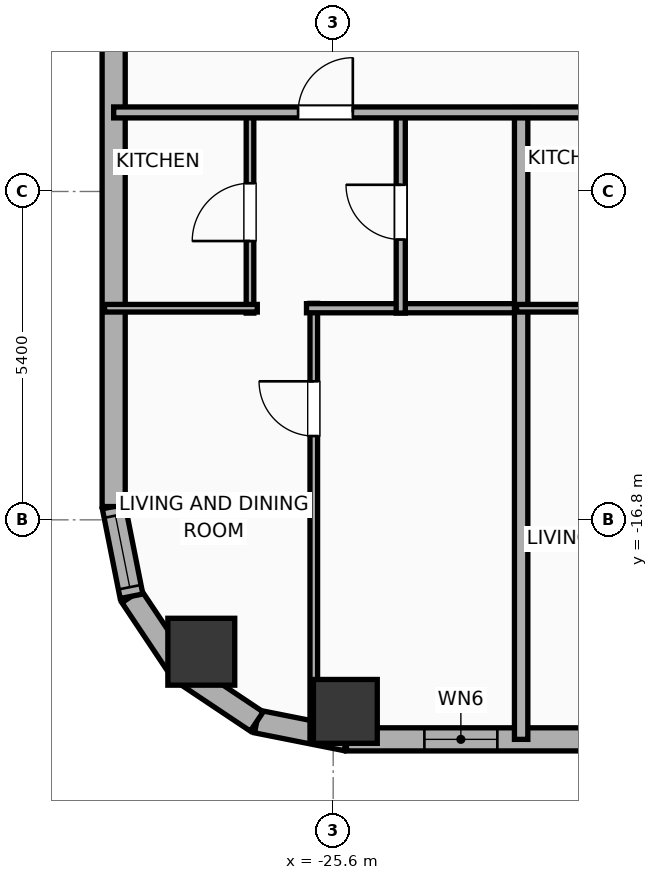
"""IFC4 building model, lengths in metres.
Left out: names, types, materials, properties, quantities, classifications, styles, units other than length and angle.
Written with IfcOpenShell. Run it as: python <this file> out.ifc"""

import sys

from ifc_helpers import new_model, si_unit, direction, frame, frame_2d, origin, origin_2d, place, context, subcontext, project, spatial, rectangle, hollow_rectangle, hollow_circle, extrude, element, fill, save


model = new_model("IFC4")
c1 = context("Model", 3, precision=1e-05, world=origin(), true_north=direction((0.0, 1.0)))
c2 = subcontext(c1, "Body", "Model", "MODEL_VIEW")
j1 = project(units=[si_unit("LENGTHUNIT", "METRE"), si_unit("PLANEANGLEUNIT", "RADIAN")], contexts=[c1])
p1 = place(None, origin())
s1 = spatial("IfcSite", under=j1, at=p1, CompositionType="ELEMENT")
p2 = place(p1, origin())
s2 = spatial("IfcBuilding", under=s1, at=p2, CompositionType="ELEMENT")
p3 = place(p2, frame((0.0, 0.0, 101.4)))
s3 = spatial("IfcBuildingStorey", under=s2, at=p3, CompositionType="ELEMENT", Elevation=101.4)
p4 = place(p3, frame((-25.4, -19.95, 0.0), z_axis=(0.0, 0.0, 1.0), x_axis=(1.0, 0.0, 0.0)))
e1 = element("IfcColumn", 1, at=p4, inside=s3, PredefinedType="COLUMN", context=c2, shape_type="SweptSolid", body=[
    extrude(hollow_rectangle(XDim=1.05, YDim=1.05, WallThickness=0.036, at=origin_2d()), origin(), (0.0, 0.0, 1.0), 3.9),
])
p5 = place(p3, frame((-27.769, -18.969, 0.0), z_axis=(0.0, 0.0, 1.0), x_axis=(1.0, 0.0, 0.0)))
e2 = element("IfcColumn", 2, at=p5, inside=s3, PredefinedType="COLUMN", context=c2, shape_type="SweptSolid", body=[
    extrude(hollow_circle(Radius=0.55, WallThickness=0.036, at=origin_2d()), origin(), (0.0, 0.0, 1.0), 3.9),
])
p6 = place(p3, frame((29.381, -20.41, 0.0), z_axis=(0.0, 0.0, 1.0), x_axis=(-1.0, 0.0, 0.0)))
e3 = element("IfcWall", 3, at=p6, inside=s3, PredefinedType="ELEMENTEDWALL", context=c2, shape_type="SweptSolid", body=[
    extrude(rectangle(XDim=54.763, YDim=0.38, at=frame_2d((27.381, 0.0))), origin(), (0.0, 0.0, 1.0), 3.65),
])
p7 = place(p6, frame((6.495, 0.0, 0.75)))
e4 = element("IfcOpeningElement", 4, at=p7, cuts=e3, PredefinedType="OPENING", context=c2, shape_type="SweptSolid", body=[
    extrude(rectangle(XDim=2.4, YDim=2.1, at=frame_2d((1.2, 1.05))), frame((0.0, 0.2, 0.0), z_axis=(0.0, -1.0, 0.0), x_axis=(1.0, 0.0, 0.0)), (0.0, 0.0, 1.0), 0.4),
])
p8 = place(p6, frame((17.686, 0.0, 0.75)))
e5 = element("IfcOpeningElement", 5, at=p8, cuts=e3, PredefinedType="OPENING", context=c2, shape_type="SweptSolid", body=[
    extrude(rectangle(XDim=2.4, YDim=2.1, at=frame_2d((1.2, 1.05))), frame((0.0, 0.2, 0.0), z_axis=(0.0, -1.0, 0.0), x_axis=(1.0, 0.0, 0.0)), (0.0, 0.0, 1.0), 0.4),
])
p9 = place(p6, frame((34.677, 0.0, 0.75)))
e6 = element("IfcOpeningElement", 6, at=p9, cuts=e3, PredefinedType="OPENING", context=c2, shape_type="SweptSolid", body=[
    extrude(rectangle(XDim=2.4, YDim=2.1, at=frame_2d((1.2, 1.05))), frame((0.0, 0.2, 0.0), z_axis=(0.0, -1.0, 0.0), x_axis=(1.0, 0.0, 0.0)), (0.0, 0.0, 1.0), 0.4),
])
p10 = place(p6, frame((45.867, 0.0, 0.75)))
e7 = element("IfcOpeningElement", 7, at=p10, cuts=e3, PredefinedType="OPENING", context=c2, shape_type="SweptSolid", body=[
    extrude(rectangle(XDim=2.4, YDim=2.1, at=frame_2d((1.2, 1.05))), frame((0.0, 0.2, 0.0), z_axis=(0.0, -1.0, 0.0), x_axis=(1.0, 0.0, 0.0)), (0.0, 0.0, 1.0), 0.4),
])
p11 = place(p6, frame((52.281, 0.0, 0.75)))
e8 = element("IfcOpeningElement", 8, at=p11, cuts=e3, PredefinedType="OPENING", context=c2, shape_type="SweptSolid", body=[
    extrude(rectangle(XDim=1.2, YDim=2.05, at=frame_2d((0.6, 1.025))), frame((0.0, 0.2, 0.0), z_axis=(0.0, -1.0, 0.0), x_axis=(1.0, 0.0, 0.0)), (0.0, 0.0, 1.0), 0.4),
])
p12 = place(p6, frame((49.641, 0.0, 0.75)))
e9 = element("IfcOpeningElement", 9, at=p12, cuts=e3, PredefinedType="OPENING", context=c2, shape_type="SweptSolid", body=[
    extrude(rectangle(XDim=1.2, YDim=2.05, at=frame_2d((0.6, 1.025))), frame((0.0, 0.2, 0.0), z_axis=(0.0, -1.0, 0.0), x_axis=(1.0, 0.0, 0.0)), (0.0, 0.0, 1.0), 0.4),
])
p13 = place(p6, frame((39.543, 0.0, 0.75)))
e10 = element("IfcOpeningElement", 10, at=p13, cuts=e3, PredefinedType="OPENING", context=c2, shape_type="SweptSolid", body=[
    extrude(rectangle(XDim=1.2, YDim=2.05, at=frame_2d((0.6, 1.025))), frame((0.0, 0.2, 0.0), z_axis=(0.0, -1.0, 0.0), x_axis=(1.0, 0.0, 0.0)), (0.0, 0.0, 1.0), 0.4),
])
p14 = place(p6, frame((44.538, 0.0, 0.75)))
e11 = element("IfcOpeningElement", 11, at=p14, cuts=e3, PredefinedType="OPENING", context=c2, shape_type="SweptSolid", body=[
    extrude(rectangle(XDim=0.52, YDim=2.05, at=frame_2d((0.26, 1.025))), frame((0.0, 0.2, 0.0), z_axis=(0.0, -1.0, 0.0), x_axis=(1.0, 0.0, 0.0)), (0.0, 0.0, 1.0), 0.4),
])
p15 = place(p6, frame((28.206, 0.0, 0.75)))
e12 = element("IfcOpeningElement", 12, at=p15, cuts=e3, PredefinedType="OPENING", context=c2, shape_type="SweptSolid", body=[
    extrude(rectangle(XDim=1.2, YDim=2.05, at=frame_2d((0.6, 1.025))), frame((0.0, 0.2, 0.0), z_axis=(0.0, -1.0, 0.0), x_axis=(1.0, 0.0, 0.0)), (0.0, 0.0, 1.0), 0.4),
])
p16 = place(p6, frame((31.241, 0.0, 0.75)))
e13 = element("IfcOpeningElement", 13, at=p16, cuts=e3, PredefinedType="OPENING", context=c2, shape_type="SweptSolid", body=[
    extrude(rectangle(XDim=0.85, YDim=2.05, at=frame_2d((0.425, 1.025))), frame((0.0, 0.2, 0.0), z_axis=(0.0, -1.0, 0.0), x_axis=(1.0, 0.0, 0.0)), (0.0, 0.0, 1.0), 0.4),
])
p17 = place(p6, frame((24.561, 0.0, 0.75)))
e14 = element("IfcOpeningElement", 14, at=p17, cuts=e3, PredefinedType="OPENING", context=c2, shape_type="SweptSolid", body=[
    extrude(rectangle(XDim=1.2, YDim=2.05, at=frame_2d((0.6, 1.025))), frame((0.0, 0.2, 0.0), z_axis=(0.0, -1.0, 0.0), x_axis=(1.0, 0.0, 0.0)), (0.0, 0.0, 1.0), 0.4),
])
p18 = place(p6, frame((22.561, 0.0, 0.75)))
e15 = element("IfcOpeningElement", 15, at=p18, cuts=e3, PredefinedType="OPENING", context=c2, shape_type="SweptSolid", body=[
    extrude(rectangle(XDim=0.52, YDim=2.05, at=frame_2d((0.26, 1.025))), frame((0.0, 0.2, 0.0), z_axis=(0.0, -1.0, 0.0), x_axis=(1.0, 0.0, 0.0)), (0.0, 0.0, 1.0), 0.4),
])
p19 = place(p6, frame((13.886, 0.0, 0.75)))
e16 = element("IfcOpeningElement", 16, at=p19, cuts=e3, PredefinedType="OPENING", context=c2, shape_type="SweptSolid", body=[
    extrude(rectangle(XDim=1.2, YDim=2.05, at=frame_2d((0.6, 1.025))), frame((0.0, 0.2, 0.0), z_axis=(0.0, -1.0, 0.0), x_axis=(1.0, 0.0, 0.0)), (0.0, 0.0, 1.0), 0.4),
])
p20 = place(p6, frame((11.694, 0.0, 0.75)))
e17 = element("IfcOpeningElement", 17, at=p20, cuts=e3, PredefinedType="OPENING", context=c2, shape_type="SweptSolid", body=[
    extrude(rectangle(XDim=0.85, YDim=2.05, at=frame_2d((0.425, 1.025))), frame((0.0, 0.2, 0.0), z_axis=(0.0, -1.0, 0.0), x_axis=(1.0, 0.0, 0.0)), (0.0, 0.0, 1.0), 0.4),
])
p21 = place(p6, frame((3.286, 0.0, 0.75)))
e18 = element("IfcOpeningElement", 18, at=p21, cuts=e3, PredefinedType="OPENING", context=c2, shape_type="SweptSolid", body=[
    extrude(rectangle(XDim=1.2, YDim=2.05, at=frame_2d((0.6, 1.025))), frame((0.0, 0.2, 0.0), z_axis=(0.0, -1.0, 0.0), x_axis=(1.0, 0.0, 0.0)), (0.0, 0.0, 1.0), 0.4),
])
p22 = place(p6, frame((0.816, 0.0, 0.75)))
e19 = element("IfcOpeningElement", 19, at=p22, cuts=e3, PredefinedType="OPENING", context=c2, shape_type="SweptSolid", body=[
    extrude(rectangle(XDim=1.2, YDim=2.05, at=frame_2d((0.6, 1.025))), frame((0.0, 0.2, 0.0), z_axis=(0.0, -1.0, 0.0), x_axis=(1.0, 0.0, 0.0)), (0.0, 0.0, 1.0), 0.4),
])
p23 = place(p3, frame((-25.381, -20.41, 0.0), z_axis=(0.0, 0.0, 1.0), x_axis=(-0.980786132421, 0.195086038585, 0.0)))
e20 = element("IfcWall", 20, at=p23, inside=s3, PredefinedType="ELEMENTEDWALL", context=c2, shape_type="SweptSolid", body=[
    extrude(rectangle(XDim=1.504, YDim=0.38, at=frame_2d((0.752, 0.0))), origin(), (0.0, 0.0, 1.0), 3.65),
])
p24 = place(p3, frame((-26.857, -20.116, 0.0), z_axis=(0.0, 0.0, 1.0), x_axis=(-0.831468045563, 0.555572577804, 0.0)))
e21 = element("IfcWall", 21, at=p24, inside=s3, PredefinedType="ELEMENTEDWALL", context=c2, shape_type="SweptSolid", body=[
    extrude(rectangle(XDim=1.485, YDim=0.38, at=frame_2d((0.742, 0.0))), origin(), (0.0, 0.0, 1.0), 3.65),
])
p25 = place(p3, frame((-28.091, -19.292, 0.0), z_axis=(0.0, 0.0, 1.0), x_axis=(-0.555610286119, 0.831442848281, 0.0)))
e22 = element("IfcWall", 22, at=p25, inside=s3, PredefinedType="ELEMENTEDWALL", context=c2, shape_type="SweptSolid", body=[
    extrude(rectangle(XDim=1.485, YDim=0.38, at=frame_2d((0.743, 0.0))), origin(), (0.0, 0.0, 1.0), 3.65),
])
p26 = place(p3, frame((-28.917, -18.057, 0.0), z_axis=(0.0, 0.0, 1.0), x_axis=(-0.195086038585, 0.980786132421, 0.0)))
e23 = element("IfcWall", 23, at=p26, inside=s3, PredefinedType="ELEMENTEDWALL", context=c2, shape_type="SweptSolid", body=[
    extrude(rectangle(XDim=1.504, YDim=0.38, at=frame_2d((0.752, 0.0))), origin(), (0.0, 0.0, 1.0), 3.65),
])
p27 = place(p26, frame((0.152, 0.0, 0.75)))
e24 = element("IfcOpeningElement", 24, at=p27, cuts=e23, PredefinedType="OPENING", context=c2, shape_type="SweptSolid", body=[
    extrude(rectangle(XDim=1.2, YDim=2.05, at=frame_2d((0.6, 1.025))), frame((0.0, 0.2, 0.0), z_axis=(0.0, -1.0, 0.0), x_axis=(1.0, 0.0, 0.0)), (0.0, 0.0, 1.0), 0.4),
])
p28 = place(p3, frame((-29.21, -16.581, 0.0), z_axis=(0.0, 0.0, 1.0), x_axis=(0.0, 1.0, 0.0)))
e25 = element("IfcWall", 25, at=p28, inside=s3, PredefinedType="ELEMENTEDWALL", context=c2, shape_type="SweptSolid", body=[
    extrude(rectangle(XDim=34.363, YDim=0.38, at=frame_2d((17.181, 0.0))), origin(), (0.0, 0.0, 1.0), 3.65),
])
p29 = place(p28, frame((31.087, 0.0, 0.75)))
e26 = element("IfcOpeningElement", 26, at=p29, cuts=e25, PredefinedType="OPENING", context=c2, shape_type="SweptSolid", body=[
    extrude(rectangle(XDim=1.2, YDim=2.05, at=frame_2d((0.6, 1.025))), frame((0.0, 0.2, 0.0), z_axis=(0.0, -1.0, 0.0), x_axis=(1.0, 0.0, 0.0)), (0.0, 0.0, 1.0), 0.4),
])
p30 = place(p28, frame((21.626, 0.0, 0.75)))
e27 = element("IfcOpeningElement", 27, at=p30, cuts=e25, PredefinedType="OPENING", context=c2, shape_type="SweptSolid", body=[
    extrude(rectangle(XDim=1.2, YDim=2.05, at=frame_2d((0.6, 1.025))), frame((0.0, 0.2, 0.0), z_axis=(0.0, -1.0, 0.0), x_axis=(1.0, 0.0, 0.0)), (0.0, 0.0, 1.0), 0.4),
])
p31 = place(p28, frame((10.551, 0.0, 0.75)))
e28 = element("IfcOpeningElement", 28, at=p31, cuts=e25, PredefinedType="OPENING", context=c2, shape_type="SweptSolid", body=[
    extrude(rectangle(XDim=1.2, YDim=2.05, at=frame_2d((0.6, 1.025))), frame((0.0, 0.2, 0.0), z_axis=(0.0, -1.0, 0.0), x_axis=(1.0, 0.0, 0.0)), (0.0, 0.0, 1.0), 0.4),
])
p32 = place(p3, frame((-25.919, -20.456, 0.0), z_axis=(0.0, 0.0, 1.0), x_axis=(0.0, 1.0, 0.0)))
e29 = element("IfcWall", 29, at=p32, inside=s3, PredefinedType="PARTITIONING", context=c2, shape_type="SweptSolid", body=[
    extrude(rectangle(XDim=7.216, YDim=0.125, at=frame_2d((3.608, 0.0))), origin(), (0.0, 0.0, 1.0), 3.65),
])
p33 = place(p32, frame((5.034, 0.0, 0.0)))
e30 = element("IfcOpeningElement", 30, at=p33, cuts=e29, PredefinedType="OPENING", context=c2, shape_type="SweptSolid", body=[
    extrude(rectangle(XDim=0.9, YDim=2.05, at=frame_2d((0.45, 1.025))), frame((0.0, 0.073, 0.0), z_axis=(0.0, -1.0, 0.0), x_axis=(1.0, 0.0, 0.0)), (0.0, 0.0, 1.0), 0.145),
])
p34 = place(p3, frame((-26.039, -13.32, 0.0), z_axis=(0.0, 0.0, 1.0), x_axis=(1.0, 0.0, 0.0)))
e31 = element("IfcWall", 31, at=p34, inside=s3, PredefinedType="PLUMBINGWALL", context=c2, shape_type="SweptSolid", body=[
    extrude(rectangle(XDim=3.605, YDim=0.15, at=frame_2d((1.802, 0.0))), origin(), (0.0, 0.0, 1.0), 3.65),
])
p35 = place(p3, frame((-26.968, -13.4, 0.0), z_axis=(0.0, 0.0, 1.0), x_axis=(0.0, 1.0, 0.0)))
e32 = element("IfcWall", 32, at=p35, inside=s3, PredefinedType="PARTITIONING", context=c2, shape_type="SweptSolid", body=[
    extrude(rectangle(XDim=3.32, YDim=0.125, at=frame_2d((1.66, 0.0))), origin(), (0.0, 0.0, 1.0), 3.65),
])
p36 = place(p35, frame((1.185, 0.0, 0.0)))
e33 = element("IfcOpeningElement", 33, at=p36, cuts=e32, PredefinedType="OPENING", context=c2, shape_type="SweptSolid", body=[
    extrude(rectangle(XDim=0.95, YDim=2.05, at=frame_2d((0.475, 1.025))), frame((0.0, 0.073, 0.0), z_axis=(0.0, -1.0, 0.0), x_axis=(1.0, 0.0, 0.0)), (0.0, 0.0, 1.0), 0.145),
])
p37 = place(p3, frame((-29.36, -13.32, 0.0), z_axis=(0.0, 0.0, 1.0), x_axis=(1.0, 0.0, 0.0)))
e34 = element("IfcWall", 34, at=p37, inside=s3, PredefinedType="PARTITIONING", context=c2, shape_type="SweptSolid", body=[
    extrude(rectangle(XDim=2.512, YDim=0.125, at=frame_2d((1.256, 0.0))), origin(), (0.0, 0.0, 1.0), 3.65),
])
p38 = place(p3, frame((-24.489, -13.4, 0.0), z_axis=(0.0, 0.0, 1.0), x_axis=(0.0, 1.0, 0.0)))
e35 = element("IfcWall", 35, at=p38, inside=s3, PredefinedType="PLUMBINGWALL", context=c2, shape_type="SweptSolid", body=[
    extrude(rectangle(XDim=3.32, YDim=0.15, at=frame_2d((1.66, 0.0))), origin(), (0.0, 0.0, 1.0), 3.65),
])
p39 = place(p38, frame((1.21, 0.0, 0.0)))
e36 = element("IfcOpeningElement", 36, at=p39, cuts=e35, PredefinedType="OPENING", context=c2, shape_type="SweptSolid", body=[
    extrude(rectangle(XDim=0.9, YDim=2.05, at=frame_2d((0.45, 1.025))), frame((0.0, 0.085, 0.0), z_axis=(0.0, -1.0, 0.0), x_axis=(1.0, 0.0, 0.0)), (0.0, 0.0, 1.0), 0.17),
])
p40 = place(p3, frame((-22.509, -20.41, 0.0), z_axis=(0.0, 0.0, 1.0), x_axis=(0.0, 1.0, 0.0)))
e37 = element("IfcWall", 37, at=p40, inside=s3, PredefinedType="PARTITIONING", context=c2, shape_type="SweptSolid", body=[
    extrude(rectangle(XDim=10.39, YDim=0.22, at=frame_2d((5.195, 0.0))), origin(), (0.0, 0.0, 1.0), 3.65),
])
p41 = place(p3, frame((-22.584, -13.32, 0.0), z_axis=(0.0, 0.0, 1.0), x_axis=(1.0, 0.0, 0.0)))
e38 = element("IfcWall", 38, at=p41, inside=s3, PredefinedType="PARTITIONING", context=c2, shape_type="SweptSolid", body=[
    extrude(rectangle(XDim=2.505, YDim=0.125, at=frame_2d((1.252, 0.0))), origin(), (0.0, 0.0, 1.0), 3.65),
])
p42 = place(p3, frame((-29.21, -10.1, 0.0), z_axis=(0.0, 0.0, 1.0), x_axis=(1.0, 0.0, 0.0)))
e39 = element("IfcWall", 39, at=p42, inside=s3, PredefinedType="PARTITIONING", context=c2, shape_type="SweptSolid", body=[
    extrude(rectangle(XDim=62.42, YDim=0.18, at=frame_2d((31.21, 0.0))), origin(), (0.0, 0.0, 1.0), 3.65),
])
p43 = place(p42, frame((3.033, 0.0, 0.0)))
e40 = element("IfcOpeningElement", 40, at=p43, cuts=e39, PredefinedType="OPENING", context=c2, shape_type="SweptSolid", body=[
    extrude(rectangle(XDim=0.9, YDim=2.05, at=frame_2d((0.45, 1.025))), frame((0.0, 0.1, 0.0), z_axis=(0.0, -1.0, 0.0), x_axis=(1.0, 0.0, 0.0)), (0.0, 0.0, 1.0), 0.2),
])
p44 = place(p42, frame((9.768, 0.0, 0.0)))
e41 = element("IfcOpeningElement", 41, at=p44, cuts=e39, PredefinedType="OPENING", context=c2, shape_type="SweptSolid", body=[
    extrude(rectangle(XDim=0.9, YDim=2.05, at=frame_2d((0.45, 1.025))), frame((0.0, 0.1, 0.0), z_axis=(0.0, -1.0, 0.0), x_axis=(1.0, 0.0, 0.0)), (0.0, 0.0, 1.0), 0.2),
])
p45 = place(p42, frame((18.65, 0.0, 0.0)))
e42 = element("IfcOpeningElement", 42, at=p45, cuts=e39, PredefinedType="OPENING", context=c2, shape_type="SweptSolid", body=[
    extrude(rectangle(XDim=1.15, YDim=2.05, at=frame_2d((0.575, 1.025))), frame((0.0, 0.1, 0.0), z_axis=(0.0, -1.0, 0.0), x_axis=(1.0, 0.0, 0.0)), (0.0, 0.0, 1.0), 0.2),
])
p46 = place(p42, frame((29.212, 0.0, 0.0)))
e43 = element("IfcOpeningElement", 43, at=p46, cuts=e39, PredefinedType="OPENING", context=c2, shape_type="SweptSolid", body=[
    extrude(rectangle(XDim=1.15, YDim=2.05, at=frame_2d((0.575, 1.025))), frame((0.0, 0.1, 0.0), z_axis=(0.0, -1.0, 0.0), x_axis=(1.0, 0.0, 0.0)), (0.0, 0.0, 1.0), 0.2),
])
p47 = place(p42, frame((40.379, 0.0, 0.0)))
e44 = element("IfcOpeningElement", 44, at=p47, cuts=e39, PredefinedType="OPENING", context=c2, shape_type="SweptSolid", body=[
    extrude(rectangle(XDim=1.15, YDim=2.05, at=frame_2d((0.575, 1.025))), frame((0.0, 0.1, 0.0), z_axis=(0.0, -1.0, 0.0), x_axis=(1.0, 0.0, 0.0)), (0.0, 0.0, 1.0), 0.2),
])
p48 = place(p42, frame((50.959, 0.0, 0.0)))
e45 = element("IfcOpeningElement", 45, at=p48, cuts=e39, PredefinedType="OPENING", context=c2, shape_type="SweptSolid", body=[
    extrude(rectangle(XDim=1.15, YDim=2.05, at=frame_2d((0.575, 1.025))), frame((0.0, 0.1, 0.0), z_axis=(0.0, -1.0, 0.0), x_axis=(1.0, 0.0, 0.0)), (0.0, 0.0, 1.0), 0.2),
])
p49 = place(p42, frame((59.117, 0.0, 0.0)))
e46 = element("IfcOpeningElement", 46, at=p49, cuts=e39, PredefinedType="OPENING", context=c2, shape_type="SweptSolid", body=[
    extrude(rectangle(XDim=0.9, YDim=2.05, at=frame_2d((0.45, 1.025))), frame((0.0, 0.1, 0.0), z_axis=(0.0, -1.0, 0.0), x_axis=(1.0, 0.0, 0.0)), (0.0, 0.0, 1.0), 0.2),
])
p50 = place(p27, origin())
e47 = element("IfcWindow", 47, at=p50, inside=s3, PartitioningType="SINGLE_PANEL", PredefinedType="WINDOW", context=c2, shape_type="SweptSolid", body=[
    extrude(rectangle(XDim=1.2, YDim=2.05, at=frame_2d((0.6, 1.025))), frame((0.0, 0.03, 0.0), z_axis=(0.0, -1.0, 0.0), x_axis=(1.0, 0.0, 0.0)), (0.0, 0.0, 1.0), 0.06),
])
fill(e24, e47)
p51 = place(p11, origin())
e48 = element("IfcWindow", 48, at=p51, inside=s3, PartitioningType="SINGLE_PANEL", PredefinedType="WINDOW", context=c2, shape_type="SweptSolid", body=[
    extrude(rectangle(XDim=1.2, YDim=2.05, at=frame_2d((0.6, 1.025))), frame((0.0, 0.03, 0.0), z_axis=(0.0, -1.0, 0.0), x_axis=(1.0, 0.0, 0.0)), (0.0, 0.0, 1.0), 0.06),
])
fill(e8, e48)
p52 = place(p33, origin())
e49 = element("IfcDoor", 49, at=p52, inside=s3, OperationType="SINGLE_SWING_RIGHT", PredefinedType="DOOR", context=c2, shape_type="SweptSolid", body=[
    extrude(rectangle(XDim=0.9, YDim=2.05, at=frame_2d((0.45, 1.025))), frame((0.0, 0.025, 0.0), z_axis=(0.0, -1.0, 0.0), x_axis=(1.0, 0.0, 0.0)), (0.0, 0.0, 1.0), 0.05),
])
fill(e30, e49)
p53 = place(p36, origin())
e50 = element("IfcDoor", 50, at=p53, inside=s3, OperationType="SINGLE_SWING_LEFT", PredefinedType="DOOR", context=c2, shape_type="SweptSolid", body=[
    extrude(rectangle(XDim=0.95, YDim=2.05, at=frame_2d((0.475, 1.025))), frame((0.0, 0.025, 0.0), z_axis=(0.0, -1.0, 0.0), x_axis=(1.0, 0.0, 0.0)), (0.0, 0.0, 1.0), 0.05),
])
fill(e33, e50)
p54 = place(p39, origin())
e51 = element("IfcDoor", 51, at=p54, inside=s3, OperationType="SINGLE_SWING_RIGHT", PredefinedType="DOOR", context=c2, shape_type="SweptSolid", body=[
    extrude(rectangle(XDim=0.9, YDim=2.05, at=frame_2d((0.45, 1.025))), frame((0.0, 0.025, 0.0), z_axis=(0.0, -1.0, 0.0), x_axis=(1.0, 0.0, 0.0)), (0.0, 0.0, 1.0), 0.05),
])
fill(e36, e51)
p55 = place(p43, origin())
e52 = element("IfcDoor", 52, at=p55, inside=s3, OperationType="SINGLE_SWING_RIGHT", PredefinedType="DOOR", context=c2, shape_type="SweptSolid", body=[
    extrude(rectangle(XDim=0.9, YDim=2.05, at=frame_2d((0.45, 1.025))), frame((0.0, 0.025, 0.0), z_axis=(0.0, -1.0, 0.0), x_axis=(1.0, 0.0, 0.0)), (0.0, 0.0, 1.0), 0.05),
])
fill(e40, e52)
save(model, sys.argv[1])
